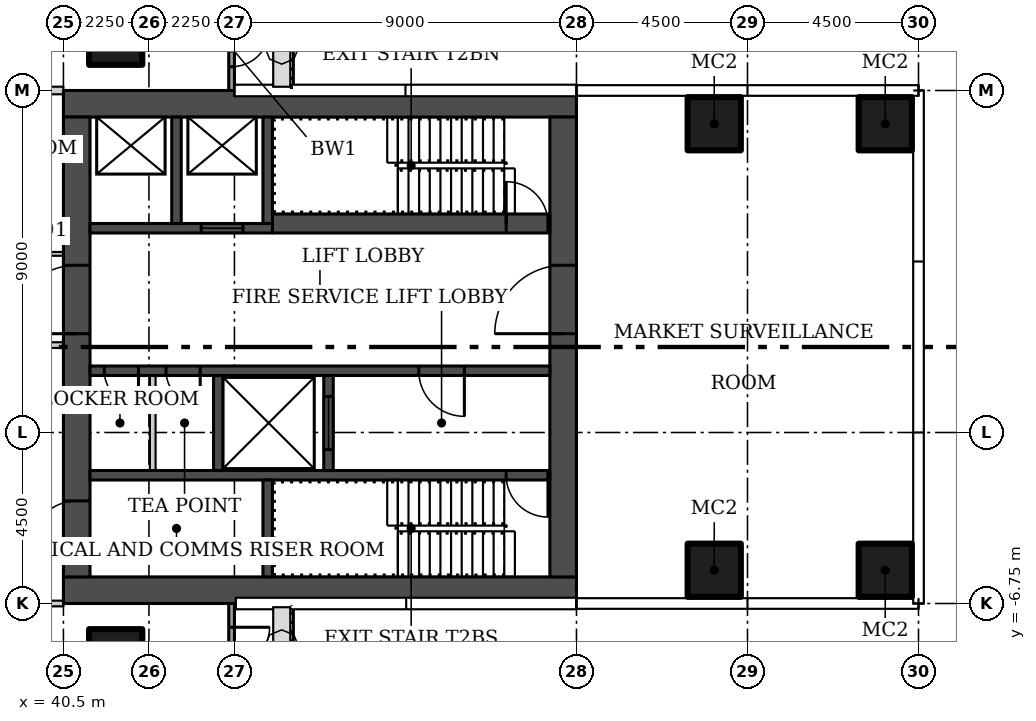
"""IFC4 building model, lengths in metres.
Left out: names, types, materials, properties, quantities, classifications, styles, units other than length and angle.
Written with IfcOpenShell. Run it as: python <this file> out.ifc"""

import sys

from ifc_helpers import new_model, si_unit, direction, frame, frame_2d, origin, origin_2d, place, context, subcontext, project, spatial, rectangle, hollow_rectangle, extrude, element, fill, save


model = new_model("IFC4")
c1 = context("Model", 3, precision=1e-05, world=origin(), true_north=direction((0.0, 1.0)))
c2 = subcontext(c1, "Body", "Model", "MODEL_VIEW")
j1 = project(units=[si_unit("LENGTHUNIT", "METRE"), si_unit("PLANEANGLEUNIT", "RADIAN")], contexts=[c1])
p1 = place(None, origin())
s1 = spatial("IfcSite", under=j1, at=p1, CompositionType="ELEMENT")
p2 = place(p1, origin())
s2 = spatial("IfcBuilding", under=s1, at=p2, CompositionType="ELEMENT")
p3 = place(p2, frame((0.0, 0.0, 69.3)))
s3 = spatial("IfcBuildingStorey", under=s2, at=p3, CompositionType="ELEMENT", Elevation=69.3)
for number, where in (
    (1, (41.875, 8.125, 0.0)),
    (2, (41.875, -8.125, 0.0)),
    (3, (57.625, -5.875, 0.0)),
    (4, (62.125, -5.875, 0.0)),
    (5, (57.625, 5.875, 0.0)),
    (6, (62.125, 5.875, 0.0)),
):
    element("IfcColumn", number, at=place(p3, frame(where)), inside=s3, PredefinedType="COLUMN", context=c2, shape_type="SweptSolid", body=[
        extrude(hollow_rectangle(XDim=1.4, YDim=1.4, WallThickness=0.05, at=origin_2d()), origin(), (0.0, 0.0, 1.0), 3.55),
    ])
p4 = place(p3, frame((35.15, 2.45, 0.0)))
e7 = element("IfcWall", 7, at=p4, inside=s3, PredefinedType="PARTITIONING", context=c2, shape_type="SweptSolid", body=[
    extrude(rectangle(XDim=5.35, YDim=0.1, at=frame_2d((2.675, 0.0))), origin(), (0.0, 0.0, 1.0), 3.55),
])
p5 = place(p4, frame((3.462, 0.0, 0.0)))
e8 = element("IfcOpeningElement", 8, at=p5, cuts=e7, PredefinedType="OPENING", context=c2, shape_type="SweptSolid", body=[
    extrude(rectangle(XDim=0.9, YDim=2.1, at=frame_2d((0.45, 1.05))), frame((0.0, 0.06, 0.0), z_axis=(0.0, -1.0, 0.0), x_axis=(1.0, 0.0, 0.0)), (0.0, 0.0, 1.0), 0.12),
])
p6 = place(p4, frame((0.837, 0.0, 0.0)))
e9 = element("IfcOpeningElement", 9, at=p6, cuts=e7, PredefinedType="OPENING", context=c2, shape_type="SweptSolid", body=[
    extrude(rectangle(XDim=0.9, YDim=2.1, at=frame_2d((0.45, 1.05))), frame((0.0, 0.06, 0.0), z_axis=(0.0, -1.0, 0.0), x_axis=(1.0, 0.0, 0.0)), (0.0, 0.0, 1.0), 0.12),
])
p7 = place(p3, frame((40.5, 0.05, 0.0), z_axis=(0.0, 0.0, 1.0), x_axis=(-1.0, 0.0, 0.0)))
e10 = element("IfcWall", 10, at=p7, inside=s3, PredefinedType="PARTITIONING", context=c2, shape_type="SweptSolid", body=[
    extrude(rectangle(XDim=10.575, YDim=0.15, at=frame_2d((5.288, 0.0))), origin(), (0.0, 0.0, 1.0), 3.55),
])
p8 = place(p7, frame((2.175, 0.0, 0.0)))
e11 = element("IfcOpeningElement", 11, at=p8, cuts=e10, PredefinedType="OPENING", context=c2, shape_type="SweptSolid", body=[
    extrude(rectangle(XDim=0.9, YDim=2.1, at=frame_2d((0.45, 1.05))), frame((0.0, 0.085, 0.0), z_axis=(0.0, -1.0, 0.0), x_axis=(1.0, 0.0, 0.0)), (0.0, 0.0, 1.0), 0.17),
])
p9 = place(p3, frame((29.9, 6.75, 0.0)))
e12 = element("IfcWall", 12, at=p9, inside=s3, PredefinedType="PARTITIONING", context=c2, shape_type="SweptSolid", body=[
    extrude(rectangle(XDim=10.6, YDim=0.2, at=frame_2d((5.3, 0.0))), origin(), (0.0, 0.0, 1.0), 3.55),
])
p10 = place(p3, frame((40.5, -6.75, 0.0), z_axis=(0.0, 0.0, 1.0), x_axis=(-1.0, 0.0, 0.0)))
e13 = element("IfcWall", 13, at=p10, inside=s3, PredefinedType="PARTITIONING", context=c2, shape_type="SweptSolid", body=[
    extrude(rectangle(XDim=10.575, YDim=0.15, at=frame_2d((5.288, 0.0))), origin(), (0.0, 0.0, 1.0), 3.55),
])
p11 = place(p3, frame((44.925, 9.0, 0.0), z_axis=(0.0, 0.0, 1.0), x_axis=(0.0, -1.0, 0.0)))
e14 = element("IfcWall", 14, at=p11, inside=s3, PredefinedType="SOLIDWALL", context=c2, shape_type="SweptSolid", body=[
    extrude(rectangle(XDim=2.257, YDim=0.15, at=frame_2d((1.128, 0.0))), origin(), (0.0, 0.0, 1.0), 3.45),
])
p12 = place(p11, frame((0.625, 0.0, 0.0)))
e15 = element("IfcOpeningElement", 15, at=p12, cuts=e14, PredefinedType="OPENING", context=c2, shape_type="SweptSolid", body=[
    extrude(rectangle(XDim=1.0, YDim=2.4, at=frame_2d((0.5, 1.2))), frame((0.0, 0.085, 0.0), z_axis=(0.0, -1.0, 0.0), x_axis=(1.0, 0.0, 0.0)), (0.0, 0.0, 1.0), 0.17),
])
p13 = place(p3, frame((44.925, -6.743, 0.0), z_axis=(0.0, 0.0, 1.0), x_axis=(0.0, -1.0, 0.0)))
e16 = element("IfcWall", 16, at=p13, inside=s3, PredefinedType="SOLIDWALL", context=c2, shape_type="SweptSolid", body=[
    extrude(rectangle(XDim=2.257, YDim=0.15, at=frame_2d((1.128, 0.0))), origin(), (0.0, 0.0, 1.0), 3.45),
])
p14 = place(p13, frame((0.632, 0.0, 0.0)))
e17 = element("IfcOpeningElement", 17, at=p14, cuts=e16, PredefinedType="OPENING", context=c2, shape_type="SweptSolid", body=[
    extrude(rectangle(XDim=1.0, YDim=2.4, at=frame_2d((0.5, 1.2))), frame((0.0, 0.085, 0.0), z_axis=(0.0, -1.0, 0.0), x_axis=(1.0, 0.0, 0.0)), (0.0, 0.0, 1.0), 0.17),
])
for number, where, z_axis, x_axis in (
    (18, (54.0, -6.4, 0.0), (0.0, 0.0, 1.0), (-1.0, 0.0, 0.0)),
    (19, (54.0, 6.4, 0.0), (0.0, 0.0, 1.0), (-1.0, 0.0, 0.0)),
):
    element("IfcWall", number, at=place(p3, frame(where, z_axis=z_axis, x_axis=x_axis)), inside=s3, PredefinedType="SHEAR", context=c2, shape_type="SweptSolid", body=[
        extrude(rectangle(XDim=13.5, YDim=0.7, at=frame_2d((6.75, 0.0))), origin(), (0.0, 0.0, 1.0), 3.55),
    ])
p15 = place(p3, frame((53.65, -6.05, 0.0), z_axis=(0.0, 0.0, 1.0), x_axis=(0.0, 1.0, 0.0)))
e20 = element("IfcWall", 20, at=p15, inside=s3, PredefinedType="SHEAR", context=c2, shape_type="SweptSolid", body=[
    extrude(rectangle(XDim=12.1, YDim=0.7, at=frame_2d((6.05, 0.0))), origin(), (0.0, 0.0, 1.0), 3.55),
])
p16 = place(p15, frame((6.4, 0.0, 0.0)))
e21 = element("IfcOpeningElement", 21, at=p16, cuts=e20, PredefinedType="OPENING", context=c2, shape_type="SweptSolid", body=[
    extrude(rectangle(XDim=1.8, YDim=2.4, at=frame_2d((0.9, 1.2))), frame((0.0, 0.36, 0.0), z_axis=(0.0, -1.0, 0.0), x_axis=(1.0, 0.0, 0.0)), (0.0, 0.0, 1.0), 0.72),
])
p17 = place(p3, frame((40.85, -6.05, 0.0), z_axis=(0.0, 0.0, 1.0), x_axis=(0.0, 1.0, 0.0)))
e22 = element("IfcWall", 22, at=p17, inside=s3, PredefinedType="SHEAR", context=c2, shape_type="SweptSolid", body=[
    extrude(rectangle(XDim=12.1, YDim=0.7, at=frame_2d((6.05, 0.0))), origin(), (0.0, 0.0, 1.0), 3.55),
])
p18 = place(p17, frame((0.8, 0.0, 0.0)))
e23 = element("IfcOpeningElement", 23, at=p18, cuts=e22, PredefinedType="OPENING", context=c2, shape_type="SweptSolid", body=[
    extrude(rectangle(XDim=1.2, YDim=2.1, at=frame_2d((0.6, 1.05))), frame((0.0, 0.36, 0.0), z_axis=(0.0, -1.0, 0.0), x_axis=(1.0, 0.0, 0.0)), (0.0, 0.0, 1.0), 0.72),
])
p19 = place(p17, frame((6.4, 0.0, 0.0)))
e24 = element("IfcOpeningElement", 24, at=p19, cuts=e22, PredefinedType="OPENING", context=c2, shape_type="SweptSolid", body=[
    extrude(rectangle(XDim=1.8, YDim=2.4, at=frame_2d((0.9, 1.2))), frame((0.0, 0.36, 0.0), z_axis=(0.0, -1.0, 0.0), x_axis=(1.0, 0.0, 0.0)), (0.0, 0.0, 1.0), 0.72),
])
p20 = place(p3, frame((53.3, -3.375, 0.0), z_axis=(0.0, 0.0, 1.0), x_axis=(-1.0, 0.0, 0.0)))
e25 = element("IfcWall", 25, at=p20, inside=s3, PredefinedType="SHEAR", context=c2, shape_type="SweptSolid", body=[
    extrude(rectangle(XDim=12.1, YDim=0.25, at=frame_2d((6.05, 0.0))), origin(), (0.0, 0.0, 1.0), 3.55),
])
p21 = place(p20, frame((0.05, 0.0, 0.0)))
e26 = element("IfcOpeningElement", 26, at=p21, cuts=e25, PredefinedType="OPENING", context=c2, shape_type="SweptSolid", body=[
    extrude(rectangle(XDim=1.1, YDim=2.1, at=frame_2d((0.55, 1.05))), frame((0.0, 0.135, 0.0), z_axis=(0.0, -1.0, 0.0), x_axis=(1.0, 0.0, 0.0)), (0.0, 0.0, 1.0), 0.27),
])
p22 = place(p3, frame((45.875, -6.05, 0.0), z_axis=(0.0, 0.0, 1.0), x_axis=(0.0, 1.0, 0.0)))
e27 = element("IfcWall", 27, at=p22, inside=s3, PredefinedType="SHEAR", context=c2, shape_type="SweptSolid", body=[
    extrude(rectangle(XDim=2.55, YDim=0.25, at=frame_2d((1.275, 0.0))), origin(), (0.0, 0.0, 1.0), 3.55),
])
p23 = place(p3, frame((53.3, -0.625, 0.0), z_axis=(0.0, 0.0, 1.0), x_axis=(-1.0, 0.0, 0.0)))
e28 = element("IfcWall", 28, at=p23, inside=s3, PredefinedType="SHEAR", context=c2, shape_type="SweptSolid", body=[
    extrude(rectangle(XDim=12.1, YDim=0.25, at=frame_2d((6.05, 0.0))), origin(), (0.0, 0.0, 1.0), 3.55),
])
p24 = place(p23, frame((2.25, 0.0, 0.0)))
e29 = element("IfcOpeningElement", 29, at=p24, cuts=e28, PredefinedType="OPENING", context=c2, shape_type="SweptSolid", body=[
    extrude(rectangle(XDim=1.2, YDim=2.1, at=frame_2d((0.6, 1.05))), frame((0.0, 0.135, 0.0), z_axis=(0.0, -1.0, 0.0), x_axis=(1.0, 0.0, 0.0)), (0.0, 0.0, 1.0), 0.27),
])
p25 = place(p23, frame((9.2, 0.0, 0.0)))
e30 = element("IfcOpeningElement", 30, at=p25, cuts=e28, PredefinedType="OPENING", context=c2, shape_type="SweptSolid", body=[
    extrude(rectangle(XDim=0.9, YDim=2.1, at=frame_2d((0.45, 1.05))), frame((0.0, 0.135, 0.0), z_axis=(0.0, -1.0, 0.0), x_axis=(1.0, 0.0, 0.0)), (0.0, 0.0, 1.0), 0.27),
])
p26 = place(p23, frame((10.825, 0.0, 0.0)))
e31 = element("IfcOpeningElement", 31, at=p26, cuts=e28, PredefinedType="OPENING", context=c2, shape_type="SweptSolid", body=[
    extrude(rectangle(XDim=0.9, YDim=2.1, at=frame_2d((0.45, 1.05))), frame((0.0, 0.135, 0.0), z_axis=(0.0, -1.0, 0.0), x_axis=(1.0, 0.0, 0.0)), (0.0, 0.0, 1.0), 0.27),
])
p27 = place(p3, frame((47.475, -3.25, 0.0), z_axis=(0.0, 0.0, 1.0), x_axis=(0.0, 1.0, 0.0)))
e32 = element("IfcWall", 32, at=p27, inside=s3, PredefinedType="SHEAR", context=c2, shape_type="SweptSolid", body=[
    extrude(rectangle(XDim=2.5, YDim=0.25, at=frame_2d((1.25, 0.0))), origin(), (0.0, 0.0, 1.0), 3.55),
])
p28 = place(p27, frame((0.55, 0.0, 0.0)))
e33 = element("IfcOpeningElement", 33, at=p28, cuts=e32, PredefinedType="OPENING", context=c2, shape_type="SweptSolid", body=[
    extrude(rectangle(XDim=1.4, YDim=2.4, at=frame_2d((0.7, 1.2))), frame((0.0, 0.135, 0.0), z_axis=(0.0, -1.0, 0.0), x_axis=(1.0, 0.0, 0.0)), (0.0, 0.0, 1.0), 0.27),
])
p29 = place(p3, frame((44.575, -3.25, 0.0), z_axis=(0.0, 0.0, 1.0), x_axis=(0.0, 1.0, 0.0)))
e34 = element("IfcWall", 34, at=p29, inside=s3, PredefinedType="SHEAR", context=c2, shape_type="SweptSolid", body=[
    extrude(rectangle(XDim=2.5, YDim=0.25, at=frame_2d((1.25, 0.0))), origin(), (0.0, 0.0, 1.0), 3.55),
])
p30 = place(p3, frame((42.85, -3.25, 0.0), z_axis=(0.0, 0.0, 1.0), x_axis=(0.0, 1.0, 0.0)))
e35 = element("IfcWall", 35, at=p30, inside=s3, PredefinedType="PARTITIONING", context=c2, shape_type="SweptSolid", body=[
    extrude(rectangle(XDim=2.5, YDim=0.15, at=frame_2d((1.25, 0.0))), origin(), (0.0, 0.0, 1.0), 3.55),
])
p31 = place(p3, frame((46.0, 3.25, 0.0)))
e36 = element("IfcWall", 36, at=p31, inside=s3, PredefinedType="SHEAR", context=c2, shape_type="SweptSolid", body=[
    extrude(rectangle(XDim=7.3, YDim=0.5, at=frame_2d((3.65, 0.0))), origin(), (0.0, 0.0, 1.0), 3.55),
])
p32 = place(p31, frame((6.15, 0.0, 0.0)))
e37 = element("IfcOpeningElement", 37, at=p32, cuts=e36, PredefinedType="OPENING", context=c2, shape_type="SweptSolid", body=[
    extrude(rectangle(XDim=1.1, YDim=2.1, at=frame_2d((0.55, 1.05))), frame((0.0, 0.26, 0.0), z_axis=(0.0, -1.0, 0.0), x_axis=(1.0, 0.0, 0.0)), (0.0, 0.0, 1.0), 0.52),
])
p33 = place(p3, frame((46.0, 3.125, 0.0), z_axis=(0.0, 0.0, 1.0), x_axis=(-1.0, 0.0, 0.0)))
e38 = element("IfcWall", 38, at=p33, inside=s3, PredefinedType="SHEAR", context=c2, shape_type="SweptSolid", body=[
    extrude(rectangle(XDim=4.8, YDim=0.25, at=frame_2d((2.4, 0.0))), origin(), (0.0, 0.0, 1.0), 3.55),
])
p34 = place(p33, frame((0.775, 0.0, 0.0)))
e39 = element("IfcOpeningElement", 39, at=p34, cuts=e38, PredefinedType="OPENING", context=c2, shape_type="SweptSolid", body=[
    extrude(rectangle(XDim=1.1, YDim=2.1, at=frame_2d((0.55, 1.05))), frame((0.0, 0.135, 0.0), z_axis=(0.0, -1.0, 0.0), x_axis=(1.0, 0.0, 0.0)), (0.0, 0.0, 1.0), 0.27),
])
for number, where, z_axis, x_axis in (
    (40, (45.875, 3.25, 0.0), (0.0, 0.0, 1.0), (0.0, 1.0, 0.0)),
    (41, (43.475, 3.25, 0.0), (0.0, 0.0, 1.0), (0.0, 1.0, 0.0)),
):
    element("IfcWall", number, at=place(p3, frame(where, z_axis=z_axis, x_axis=x_axis)), inside=s3, PredefinedType="SHEAR", context=c2, shape_type="SweptSolid", body=[
        extrude(rectangle(XDim=2.8, YDim=0.25, at=frame_2d((1.4, 0.0))), origin(), (0.0, 0.0, 1.0), 3.55),
    ])
p35 = place(p12, origin())
e42 = element("IfcDoor", 42, at=p35, inside=s3, OperationType="SINGLE_SWING_LEFT", PredefinedType="DOOR", context=c2, shape_type="SweptSolid", body=[
    extrude(rectangle(XDim=1.0, YDim=2.4, at=frame_2d((0.5, 1.2))), frame((0.0, 0.025, 0.0), z_axis=(0.0, -1.0, 0.0), x_axis=(1.0, 0.0, 0.0)), (0.0, 0.0, 1.0), 0.05),
])
fill(e15, e42)
p36 = place(p14, origin())
e43 = element("IfcDoor", 43, at=p36, inside=s3, OperationType="SINGLE_SWING_RIGHT", PredefinedType="DOOR", context=c2, shape_type="SweptSolid", body=[
    extrude(rectangle(XDim=1.0, YDim=2.4, at=frame_2d((0.5, 1.2))), frame((0.0, 0.025, 0.0), z_axis=(0.0, -1.0, 0.0), x_axis=(1.0, 0.0, 0.0)), (0.0, 0.0, 1.0), 0.05),
])
fill(e17, e43)
p37 = place(p16, origin())
e44 = element("IfcDoor", 44, at=p37, inside=s3, OperationType="DOUBLE_DOOR_SINGLE_SWING", PredefinedType="DOOR", context=c2, shape_type="SweptSolid", body=[
    extrude(rectangle(XDim=1.8, YDim=2.4, at=frame_2d((0.9, 1.2))), frame((0.0, 0.025, 0.0), z_axis=(0.0, -1.0, 0.0), x_axis=(1.0, 0.0, 0.0)), (0.0, 0.0, 1.0), 0.05),
])
fill(e21, e44)
p38 = place(p18, origin())
e45 = element("IfcDoor", 45, at=p38, inside=s3, OperationType="SINGLE_SWING_LEFT", PredefinedType="DOOR", context=c2, shape_type="SweptSolid", body=[
    extrude(rectangle(XDim=1.2, YDim=2.1, at=frame_2d((0.6, 1.05))), frame((0.0, 0.025, 0.0), z_axis=(0.0, -1.0, 0.0), x_axis=(1.0, 0.0, 0.0)), (0.0, 0.0, 1.0), 0.05),
])
fill(e23, e45)
p39 = place(p19, origin())
e46 = element("IfcDoor", 46, at=p39, inside=s3, OperationType="DOUBLE_DOOR_SINGLE_SWING", PredefinedType="DOOR", context=c2, shape_type="SweptSolid", body=[
    extrude(rectangle(XDim=1.8, YDim=2.4, at=frame_2d((0.9, 1.2))), frame((0.0, 0.025, 0.0), z_axis=(0.0, -1.0, 0.0), x_axis=(1.0, 0.0, 0.0)), (0.0, 0.0, 1.0), 0.05),
])
fill(e24, e46)
p40 = place(p21, origin())
e47 = element("IfcDoor", 47, at=p40, inside=s3, OperationType="SINGLE_SWING_LEFT", PredefinedType="DOOR", context=c2, shape_type="SweptSolid", body=[
    extrude(rectangle(XDim=1.1, YDim=2.1, at=frame_2d((0.55, 1.05))), frame((0.0, 0.025, 0.0), z_axis=(0.0, -1.0, 0.0), x_axis=(1.0, 0.0, 0.0)), (0.0, 0.0, 1.0), 0.05),
])
fill(e26, e47)
p41 = place(p24, origin())
e48 = element("IfcDoor", 48, at=p41, inside=s3, OperationType="SINGLE_SWING_LEFT", PredefinedType="DOOR", context=c2, shape_type="SweptSolid", body=[
    extrude(rectangle(XDim=1.2, YDim=2.1, at=frame_2d((0.6, 1.05))), frame((0.0, 0.025, 0.0), z_axis=(0.0, -1.0, 0.0), x_axis=(1.0, 0.0, 0.0)), (0.0, 0.0, 1.0), 0.05),
])
fill(e29, e48)
p42 = place(p25, origin())
e49 = element("IfcDoor", 49, at=p42, inside=s3, OperationType="SINGLE_SWING_RIGHT", PredefinedType="DOOR", context=c2, shape_type="SweptSolid", body=[
    extrude(rectangle(XDim=0.9, YDim=2.1, at=frame_2d((0.45, 1.05))), frame((0.0, 0.025, 0.0), z_axis=(0.0, -1.0, 0.0), x_axis=(1.0, 0.0, 0.0)), (0.0, 0.0, 1.0), 0.05),
])
fill(e30, e49)
p43 = place(p26, origin())
e50 = element("IfcDoor", 50, at=p43, inside=s3, OperationType="SINGLE_SWING_RIGHT", PredefinedType="DOOR", context=c2, shape_type="SweptSolid", body=[
    extrude(rectangle(XDim=0.9, YDim=2.1, at=frame_2d((0.45, 1.05))), frame((0.0, 0.025, 0.0), z_axis=(0.0, -1.0, 0.0), x_axis=(1.0, 0.0, 0.0)), (0.0, 0.0, 1.0), 0.05),
])
fill(e31, e50)
p44 = place(p28, origin())
e51 = element("IfcDoor", 51, at=p44, inside=s3, OperationType="SLIDING_TO_LEFT", PredefinedType="DOOR", context=c2, shape_type="SweptSolid", body=[
    extrude(rectangle(XDim=1.4, YDim=2.4, at=frame_2d((0.7, 1.2))), frame((0.0, 0.025, 0.0), z_axis=(0.0, -1.0, 0.0), x_axis=(1.0, 0.0, 0.0)), (0.0, 0.0, 1.0), 0.05),
])
fill(e33, e51)
p45 = place(p32, origin())
e52 = element("IfcDoor", 52, at=p45, inside=s3, OperationType="SINGLE_SWING_RIGHT", PredefinedType="DOOR", context=c2, shape_type="SweptSolid", body=[
    extrude(rectangle(XDim=1.1, YDim=2.1, at=frame_2d((0.55, 1.05))), frame((0.0, 0.025, 0.0), z_axis=(0.0, -1.0, 0.0), x_axis=(1.0, 0.0, 0.0)), (0.0, 0.0, 1.0), 0.05),
])
fill(e37, e52)
p46 = place(p34, origin())
e53 = element("IfcDoor", 53, at=p46, inside=s3, OperationType="SLIDING_TO_LEFT", PredefinedType="DOOR", context=c2, shape_type="SweptSolid", body=[
    extrude(rectangle(XDim=1.1, YDim=2.1, at=frame_2d((0.55, 1.05))), frame((0.0, 0.025, 0.0), z_axis=(0.0, -1.0, 0.0), x_axis=(1.0, 0.0, 0.0)), (0.0, 0.0, 1.0), 0.05),
])
fill(e39, e53)
save(model, sys.argv[1])
